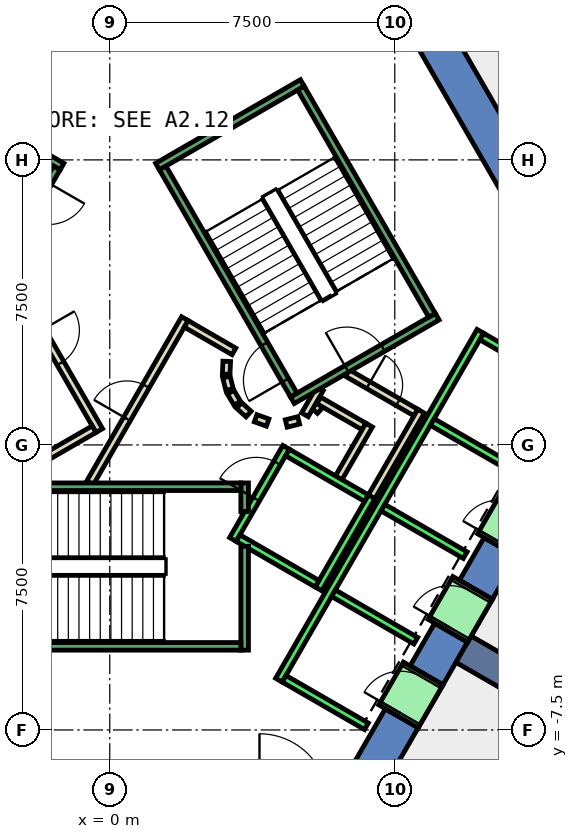
"""IFC4 building model, lengths in metres.
Left out: names, types, materials, properties, quantities, classifications, styles, units other than length and angle.
Written with IfcOpenShell. Run it as: python <this file> out.ifc"""

import sys

from ifc_helpers import new_model, si_unit, direction, frame, frame_2d, origin, place, context, subcontext, project, spatial, polyline, rectangle, outline, extrude, element, fill, save


model = new_model("IFC4")
c1 = context("Model", 3, precision=1e-05, world=origin(), true_north=direction((0.0, 1.0)))
c2 = subcontext(c1, "Body", "Model", "MODEL_VIEW")
j1 = project(units=[si_unit("LENGTHUNIT", "METRE"), si_unit("PLANEANGLEUNIT", "RADIAN")], contexts=[c1])
p1 = place(None, origin())
s1 = spatial("IfcSite", under=j1, at=p1, CompositionType="ELEMENT")
p2 = place(p1, origin())
s2 = spatial("IfcBuilding", under=s1, at=p2, CompositionType="ELEMENT")
p3 = place(p2, frame((0.0, 0.0, 47.6)))
s3 = spatial("IfcBuildingStorey", under=s2, at=p3, CompositionType="ELEMENT", Elevation=47.6)
p4 = place(p3, frame((0.0, 0.0, -0.4)))
e1 = element("IfcWall", 1, at=p4, inside=s3, PredefinedType="SHEAR", context=c2, shape_type="SweptSolid", body=[
    extrude(outline(polyline([(8.517, 11.748), (7.651, 11.248), (12.702, 2.5), (13.856, 2.5), (8.517, 11.748)])), origin(), (0.0, 0.0, 1.0), 4.2),
])
p5 = place(p3, frame((0.0, 0.0, -0.4)))
e2 = element("IfcWall", 2, at=p5, inside=s3, PredefinedType="SHEAR", context=c2, shape_type="SweptSolid", body=[
    extrude(outline(polyline([(8.117, -7.44), (7.252, -6.94), (6.351, -8.5), (6.928, -9.5), (8.117, -7.44)])), origin(), (0.0, 0.0, 1.0), 4.2),
])
p6 = place(p3, frame((0.0, 0.0, -0.4)))
e3 = element("IfcWall", 3, at=p6, inside=s3, PredefinedType="SHEAR", context=c2, shape_type="SweptSolid", body=[
    extrude(outline(polyline([(9.417, -5.189), (8.551, -4.689), (7.902, -5.814), (8.767, -6.314), (9.417, -5.189)])), origin(), (0.0, 0.0, 1.0), 4.2),
])
p7 = place(p3, frame((0.0, 0.0, -0.4)))
e4 = element("IfcWall", 4, at=p7, inside=s3, PredefinedType="SHEAR", context=c2, shape_type="SweptSolid", body=[
    extrude(outline(polyline([(10.717, -2.937), (9.851, -2.437), (9.201, -3.563), (10.067, -4.063), (10.717, -2.937)])), origin(), (0.0, 0.0, 1.0), 4.2),
])
p8 = place(p3, frame((0.0, 0.0, 3.6)))
e5 = element("IfcWall", 5, at=p8, inside=s3, PredefinedType="SHEAR", context=c2, shape_type="SweptSolid", body=[
    extrude(outline(polyline([(8.767, -6.314), (7.902, -5.814), (7.252, -6.94), (8.117, -7.44), (8.767, -6.314)])), origin(), (0.0, 0.0, 1.0), 0.2),
])
p9 = place(p3, frame((0.0, 0.0, 3.6)))
e6 = element("IfcWall", 6, at=p9, inside=s3, PredefinedType="SHEAR", context=c2, shape_type="SweptSolid", body=[
    extrude(outline(polyline([(10.067, -4.063), (9.201, -3.563), (8.551, -4.689), (9.417, -5.189), (10.067, -4.063)])), origin(), (0.0, 0.0, 1.0), 0.2),
])
p10 = place(p3, frame((0.0, 0.0, 3.6)))
e7 = element("IfcWall", 7, at=p10, inside=s3, PredefinedType="SHEAR", context=c2, shape_type="SweptSolid", body=[
    extrude(outline(polyline([(11.367, -1.811), (10.501, -1.311), (9.851, -2.437), (10.717, -2.937), (11.367, -1.811)])), origin(), (0.0, 0.0, 1.0), 0.2),
])
p11 = place(p3, frame((9.31, -5.375, -0.4), z_axis=(0.0, 0.0, 1.0), x_axis=(0.866017533419, -0.500013631625, 0.0)))
e8 = element("IfcWall", 8, at=p11, inside=s3, PredefinedType="SHEAR", context=c2, shape_type="SweptSolid", body=[
    extrude(rectangle(XDim=9.0, YDim=0.8, at=frame_2d((4.5, 0.0))), origin(), (0.0, 0.0, 1.0), 4.2),
])
p12 = place(p3, frame((5.39, 0.898, 0.0), z_axis=(0.0, 0.0, 1.0), x_axis=(0.673828488714, 0.738887791073, 0.0)))
e9 = element("IfcWall", 9, at=p12, inside=s3, PredefinedType="PARTITIONING", context=c2, shape_type="SweptSolid", body=[
    extrude(rectangle(XDim=0.263, YDim=0.2, at=frame_2d((0.131, 0.0))), origin(), (0.0, 0.0, 1.0), 3.8),
])
p13 = place(p3, frame((5.499, 1.172, 0.0), z_axis=(0.0, 0.0, 1.0), x_axis=(0.866333505267, -0.499465972466, 0.0)))
e10 = element("IfcWall", 10, at=p13, inside=s3, PredefinedType="PARTITIONING", context=c2, shape_type="SweptSolid", body=[
    extrude(rectangle(XDim=1.374, YDim=0.2, at=frame_2d((0.687, 0.0))), origin(), (0.0, 0.0, 1.0), 3.8),
])
p14 = place(p3, frame((6.826, 0.522, 0.0), z_axis=(0.0, 0.0, 1.0), x_axis=(-0.500016722714, -0.866015748706, 0.0)))
e11 = element("IfcWall", 11, at=p14, inside=s3, PredefinedType="PARTITIONING", context=c2, shape_type="SweptSolid", body=[
    extrude(rectangle(XDim=1.7, YDim=0.2, at=frame_2d((0.85, 0.0))), origin(), (0.0, 0.0, 1.0), 3.8),
])
p15 = place(p3, frame((6.25, 1.894, 0.0), z_axis=(0.0, 0.0, 1.0), x_axis=(0.866043184279, -0.499969202016, 0.0)))
e12 = element("IfcWall", 12, at=p15, inside=s3, PredefinedType="PARTITIONING", context=c2, shape_type="SweptSolid", body=[
    extrude(rectangle(XDim=2.084, YDim=0.2, at=frame_2d((1.042, 0.0))), origin(), (0.0, 0.0, 1.0), 3.8),
])
p16 = place(p15, frame((0.642, 0.0, 0.0)))
e13 = element("IfcOpeningElement", 13, at=p16, cuts=e12, PredefinedType="OPENING", context=c2, shape_type="SweptSolid", body=[
    extrude(rectangle(XDim=0.9, YDim=2.1, at=frame_2d((0.45, 1.05))), frame((0.0, 0.11, 0.0), z_axis=(0.0, -1.0, 0.0), x_axis=(1.0, 0.0, 0.0)), (0.0, 0.0, 1.0), 0.22),
])
p17 = place(p3, frame((8.192, 0.888, 0.0), z_axis=(0.0, 0.0, 1.0), x_axis=(-0.499940625693, -0.866059680843, 0.0)))
e14 = element("IfcWall", 14, at=p17, inside=s3, PredefinedType="PARTITIONING", context=c2, shape_type="SweptSolid", body=[
    extrude(rectangle(XDim=2.68, YDim=0.2, at=frame_2d((1.34, 0.0))), origin(), (0.0, 0.0, 1.0), 3.8),
])
p18 = place(p3, frame((5.135, 0.793, 0.0), z_axis=(0.0, 0.0, 1.0), x_axis=(0.499526442893, 0.866298639529, 0.0)))
e15 = element("IfcWall", 15, at=p18, inside=s3, PredefinedType="PARTITIONING", context=c2, shape_type="SweptSolid", body=[
    extrude(rectangle(XDim=0.791, YDim=0.2, at=frame_2d((0.396, 0.0))), origin(), (0.0, 0.0, 1.0), 3.8),
])
p19 = place(p3, frame((-0.52, -1.0, 0.0), z_axis=(0.0, 0.0, 1.0), x_axis=(0.50011622646, 0.865958290007, 0.0)))
e16 = element("IfcWall", 16, at=p19, inside=s3, PredefinedType="PARTITIONING", context=c2, shape_type="SweptSolid", body=[
    extrude(rectangle(XDim=4.991, YDim=0.2, at=frame_2d((2.496, 0.0))), origin(), (0.0, 0.0, 1.0), 3.8),
])
p20 = place(p19, frame((1.945, 0.0, 0.0)))
e17 = element("IfcOpeningElement", 17, at=p20, cuts=e16, PredefinedType="OPENING", context=c2, shape_type="SweptSolid", body=[
    extrude(rectangle(XDim=1.0, YDim=2.1, at=frame_2d((0.5, 1.05))), frame((0.0, 0.11, 0.0), z_axis=(0.0, -1.0, 0.0), x_axis=(1.0, 0.0, 0.0)), (0.0, 0.0, 1.0), 0.22),
])
p21 = place(p3, frame((2.012, 3.186, 0.0), z_axis=(0.0, 0.0, 1.0), x_axis=(0.865891012941, -0.500232699559, 0.0)))
e18 = element("IfcWall", 18, at=p21, inside=s3, PredefinedType="PARTITIONING", context=c2, shape_type="SweptSolid", body=[
    extrude(rectangle(XDim=1.449, YDim=0.2, at=frame_2d((0.725, 0.0))), origin(), (0.0, 0.0, 1.0), 3.8),
])
p22 = place(p3, frame((3.079, 2.199, 0.0), z_axis=(0.0, 0.0, 1.0), x_axis=(-0.047771483479, -0.998858290933, 0.0)))
e19 = element("IfcWall", 19, at=p22, inside=s3, PredefinedType="PARTITIONING", context=c2, shape_type="SweptSolid", body=[
    extrude(rectangle(XDim=0.337, YDim=0.2, at=frame_2d((0.169, 0.0))), origin(), (0.0, 0.0, 1.0), 3.8),
])
p23 = place(p3, frame((3.07, 1.786, 0.0), z_axis=(0.0, 0.0, 1.0), x_axis=(0.242705583207, -0.970099994784, 0.0)))
e20 = element("IfcWall", 20, at=p23, inside=s3, PredefinedType="PARTITIONING", context=c2, shape_type="SweptSolid", body=[
    extrude(rectangle(XDim=0.338, YDim=0.2, at=frame_2d((0.169, 0.0))), origin(), (0.0, 0.0, 1.0), 3.8),
])
for number, where, z_axis, x_axis in (
    (21, (3.182, 1.388, 0.0), (0.0, 0.0, 1.0), (0.512, -0.859, 0.0)),
    (22, (3.404, 1.039, 0.0), (0.0, 0.0, 1.0), (0.74, -0.672, 0.0)),
):
    element("IfcWall", number, at=place(p3, frame(where, z_axis=z_axis, x_axis=x_axis)), inside=s3, PredefinedType="PARTITIONING", context=c2, shape_type="SweptSolid", body=[
        extrude(rectangle(XDim=0.338, YDim=0.2, at=frame_2d((0.169, 0.0))), origin(), (0.0, 0.0, 1.0), 3.8),
    ])
p24 = place(p3, frame((3.838, 0.702, 0.0), z_axis=(0.0, 0.0, 1.0), x_axis=(0.941035081519, -0.338308993895, 0.0)))
e23 = element("IfcWall", 23, at=p24, inside=s3, PredefinedType="PARTITIONING", context=c2, shape_type="SweptSolid", body=[
    extrude(rectangle(XDim=0.337, YDim=0.2, at=frame_2d((0.168, 0.0))), origin(), (0.0, 0.0, 1.0), 3.8),
])
p25 = place(p3, frame((4.644, 0.564, 0.0), z_axis=(0.0, 0.0, 1.0), x_axis=(0.969929076366, 0.243387729394, 0.0)))
e24 = element("IfcWall", 24, at=p25, inside=s3, PredefinedType="PARTITIONING", context=c2, shape_type="SweptSolid", body=[
    extrude(rectangle(XDim=0.337, YDim=0.2, at=frame_2d((0.168, 0.0))), origin(), (0.0, 0.0, 1.0), 3.8),
])
p26 = place(p3, frame((-2.771, 4.7, 0.0), z_axis=(0.0, 0.0, 1.0), x_axis=(0.499969479948, -0.866043023828, 0.0)))
e25 = element("IfcWall", 25, at=p26, inside=s3, PredefinedType="PARTITIONING", context=c2, shape_type="SweptSolid", body=[
    extrude(rectangle(XDim=4.99, YDim=0.2, at=frame_2d((2.495, 0.0))), origin(), (0.0, 0.0, 1.0), 3.8),
])
p27 = place(p26, frame((1.945, 0.0, 0.0)))
e26 = element("IfcOpeningElement", 26, at=p27, cuts=e25, PredefinedType="OPENING", context=c2, shape_type="SweptSolid", body=[
    extrude(rectangle(XDim=1.0, YDim=2.1, at=frame_2d((0.5, 1.05))), frame((0.0, 0.11, 0.0), z_axis=(0.0, -1.0, 0.0), x_axis=(1.0, 0.0, 0.0)), (0.0, 0.0, 1.0), 0.22),
])
p28 = place(p3, frame((-0.412, 0.414, 0.0), z_axis=(0.0, 0.0, 1.0), x_axis=(-0.866017369001, -0.500013916395, 0.0)))
e27 = element("IfcWall", 27, at=p28, inside=s3, PredefinedType="PARTITIONING", context=c2, shape_type="SweptSolid", body=[
    extrude(rectangle(XDim=1.45, YDim=0.2, at=frame_2d((0.725, 0.0))), origin(), (0.0, 0.0, 1.0), 3.8),
])
p29 = place(p3, frame((12.401, -7.621, 0.0), z_axis=(0.0, 0.0, 1.0), x_axis=(-0.499983724212, -0.866034800411, 0.0)))
e28 = element("IfcWall", 28, at=p29, inside=s3, PredefinedType="PARTITIONING", context=c2, shape_type="SweptSolid", body=[
    extrude(rectangle(XDim=9.302, YDim=0.2, at=frame_2d((4.651, 0.0))), origin(), (0.0, 0.0, 1.0), 3.8),
])
p30 = place(p3, frame((3.24, -2.488, 0.0), z_axis=(0.0, 0.0, 1.0), x_axis=(0.49994636267, 0.866056369097, 0.0)))
e29 = element("IfcWall", 29, at=p30, inside=s3, PredefinedType="STANDARD", context=c2, shape_type="SweptSolid", body=[
    extrude(rectangle(XDim=2.8, YDim=0.2, at=frame_2d((1.4, 0.0))), origin(), (0.0, 0.0, 1.0), 3.8),
])
p31 = place(p30, frame((1.225, 0.0, 0.0)))
e30 = element("IfcOpeningElement", 30, at=p31, cuts=e29, PredefinedType="OPENING", context=c2, shape_type="SweptSolid", body=[
    extrude(rectangle(XDim=1.1, YDim=2.1, at=frame_2d((0.55, 1.05))), frame((0.0, 0.11, 0.0), z_axis=(0.0, -1.0, 0.0), x_axis=(1.0, 0.0, 0.0)), (0.0, 0.0, 1.0), 0.22),
])
p32 = place(p3, frame((5.492, -3.788, 0.0), z_axis=(0.0, 0.0, 1.0), x_axis=(0.500011755427, 0.866018616679, 0.0)))
e31 = element("IfcWall", 31, at=p32, inside=s3, PredefinedType="STANDARD", context=c2, shape_type="SweptSolid", body=[
    extrude(rectangle(XDim=2.8, YDim=0.2, at=frame_2d((1.4, 0.0))), origin(), (0.0, 0.0, 1.0), 3.8),
])
p33 = place(p3, frame((3.377, -2.452, 0.0), z_axis=(0.0, 0.0, 1.0), x_axis=(0.865955154139, -0.50012165622, 0.0)))
e32 = element("IfcWall", 32, at=p33, inside=s3, PredefinedType="STANDARD", context=c2, shape_type="SweptSolid", body=[
    extrude(rectangle(XDim=2.4, YDim=0.2, at=frame_2d((1.2, 0.0))), origin(), (0.0, 0.0, 1.0), 3.8),
])
p34 = place(p3, frame((4.677, -0.2, 0.0), z_axis=(0.0, 0.0, 1.0), x_axis=(0.865973769406, -0.500089422704, 0.0)))
e33 = element("IfcWall", 33, at=p34, inside=s3, PredefinedType="STANDARD", context=c2, shape_type="SweptSolid", body=[
    extrude(rectangle(XDim=2.399, YDim=0.2, at=frame_2d((1.2, 0.0))), origin(), (0.0, 0.0, 1.0), 3.8),
])
p35 = place(p3, frame((4.451, -6.19, 0.0), z_axis=(0.0, 0.0, 1.0), x_axis=(0.50000090737, 0.866024879913, 0.0)))
e34 = element("IfcWall", 34, at=p35, inside=s3, PredefinedType="STANDARD", context=c2, shape_type="SweptSolid", body=[
    extrude(rectangle(XDim=10.6, YDim=0.2, at=frame_2d((5.3, 0.0))), origin(), (0.0, 0.0, 1.0), 3.8),
])
for number, where, z_axis, x_axis in (
    (35, (4.588, -6.153, 0.0), (0.0, 0.0, 1.0), (0.866, -0.5, 0.0)),
    (36, (5.888, -3.902, 0.0), (0.0, 0.0, 1.0), (0.866, -0.5, 0.0)),
    (37, (7.188, -1.65, 0.0), (0.0, 0.0, 1.0), (0.866, -0.5, 0.0)),
    (38, (8.488, 0.602, 0.0), (0.0, 0.0, 1.0), (0.866, -0.5, 0.0)),
):
    element("IfcWall", number, at=place(p3, frame(where, z_axis=z_axis, x_axis=x_axis)), inside=s3, PredefinedType="STANDARD", context=c2, shape_type="SweptSolid", body=[
        extrude(rectangle(XDim=2.5, YDim=0.2, at=frame_2d((1.25, 0.0))), origin(), (0.0, 0.0, 1.0), 3.8),
    ])
p36 = place(p3, frame((9.788, 2.853, 0.0), z_axis=(0.0, 0.0, 1.0), x_axis=(0.865998541277, -0.500046524342, 0.0)))
e39 = element("IfcWall", 39, at=p36, inside=s3, PredefinedType="STANDARD", context=c2, shape_type="SweptSolid", body=[
    extrude(rectangle(XDim=2.5, YDim=0.2, at=frame_2d((1.25, 0.0))), origin(), (0.0, 0.0, 1.0), 3.8),
])
p37 = place(p3, frame((7.598, -7.14, 0.0), z_axis=(0.0, 0.0, 1.0), x_axis=(0.500362116554, 0.865816234728, 0.0)))
e40 = element("IfcWall", 40, at=p37, inside=s3, PredefinedType="STANDARD", context=c2, shape_type="SweptSolid", body=[
    extrude(rectangle(XDim=1.299, YDim=1.2, at=frame_2d((0.65, 0.0))), origin(), (0.0, 0.0, 1.0), 2.4),
])
p38 = place(p37, frame((0.1, 0.0, 0.0)))
e41 = element("IfcOpeningElement", 41, at=p38, cuts=e40, PredefinedType="OPENING", context=c2, shape_type="SweptSolid", body=[
    extrude(rectangle(XDim=1.1, YDim=2.3, at=frame_2d((0.55, 1.15))), frame((0.0, 0.61, 0.0), z_axis=(0.0, -1.0, 0.0), x_axis=(1.0, 0.0, 0.0)), (0.0, 0.0, 1.0), 1.22),
])
p39 = place(p3, frame((8.898, -4.889, 0.0), z_axis=(0.0, 0.0, 1.0), x_axis=(0.500036693733, 0.866004217611, 0.0)))
e42 = element("IfcWall", 42, at=p39, inside=s3, PredefinedType="STANDARD", context=c2, shape_type="SweptSolid", body=[
    extrude(rectangle(XDim=1.3, YDim=1.2, at=frame_2d((0.65, 0.0))), origin(), (0.0, 0.0, 1.0), 2.4),
])
p40 = place(p39, frame((0.1, 0.0, 0.0)))
e43 = element("IfcOpeningElement", 43, at=p40, cuts=e42, PredefinedType="OPENING", context=c2, shape_type="SweptSolid", body=[
    extrude(rectangle(XDim=1.1, YDim=2.3, at=frame_2d((0.55, 1.15))), frame((0.0, 0.61, 0.0), z_axis=(0.0, -1.0, 0.0), x_axis=(1.0, 0.0, 0.0)), (0.0, 0.0, 1.0), 1.22),
])
p41 = place(p3, frame((10.198, -2.637, 0.0), z_axis=(0.0, 0.0, 1.0), x_axis=(0.49989585183, 0.866085525409, 0.0)))
e44 = element("IfcWall", 44, at=p41, inside=s3, PredefinedType="STANDARD", context=c2, shape_type="SweptSolid", body=[
    extrude(rectangle(XDim=1.3, YDim=1.2, at=frame_2d((0.65, 0.0))), origin(), (0.0, 0.0, 1.0), 2.4),
])
p42 = place(p41, frame((0.1, 0.0, 0.0)))
e45 = element("IfcOpeningElement", 45, at=p42, cuts=e44, PredefinedType="OPENING", context=c2, shape_type="SweptSolid", body=[
    extrude(rectangle(XDim=1.1, YDim=2.3, at=frame_2d((0.55, 1.15))), frame((0.0, 0.61, 0.0), z_axis=(0.0, -1.0, 0.0), x_axis=(1.0, 0.0, 0.0)), (0.0, 0.0, 1.0), 1.22),
])
p43 = place(p3, frame((3.55, -2.667, 0.0), z_axis=(0.0, 0.0, 1.0), x_axis=(0.0, -1.0, 0.0)))
e46 = element("IfcWall", 46, at=p43, inside=s3, PredefinedType="STANDARD", context=c2, shape_type="SweptSolid", body=[
    extrude(rectangle(XDim=2.733, YDim=0.2, at=frame_2d((1.366, 0.0))), origin(), (0.0, 0.0, 1.0), 3.8),
])
p44 = place(p3, frame((3.55, -1.0, 0.0), z_axis=(0.0, 0.0, 1.0), x_axis=(0.0, -1.0, 0.0)))
e47 = element("IfcWall", 47, at=p44, inside=s3, PredefinedType="STANDARD", context=c2, shape_type="SweptSolid", body=[
    extrude(rectangle(XDim=0.751, YDim=0.2, at=frame_2d((0.375, 0.0))), origin(), (0.0, 0.0, 1.0), 3.8),
])
p45 = place(p3, frame((-3.45, -1.1, 0.0), z_axis=(0.0, 0.0, 1.0), x_axis=(1.0, 0.0, 0.0)))
e48 = element("IfcWall", 48, at=p45, inside=s3, PredefinedType="STANDARD", context=c2, shape_type="SweptSolid", body=[
    extrude(rectangle(XDim=6.9, YDim=0.2, at=frame_2d((3.45, 0.0))), origin(), (0.0, 0.0, 1.0), 3.8),
])
p46 = place(p45, frame((0.45, 0.0, 0.0)))
e49 = element("IfcOpeningElement", 49, at=p46, cuts=e48, PredefinedType="OPENING", context=c2, shape_type="SweptSolid", body=[
    extrude(rectangle(XDim=1.1, YDim=2.2, at=frame_2d((0.55, 1.1))), frame((0.0, 0.11, 0.0), z_axis=(0.0, -1.0, 0.0), x_axis=(1.0, 0.0, 0.0)), (0.0, 0.0, 1.0), 0.22),
])
p47 = place(p3, frame((-3.45, -5.3, 0.0), z_axis=(0.0, 0.0, 1.0), x_axis=(1.0, 0.0, 0.0)))
e50 = element("IfcWall", 50, at=p47, inside=s3, PredefinedType="STANDARD", context=c2, shape_type="SweptSolid", body=[
    extrude(rectangle(XDim=6.9, YDim=0.2, at=frame_2d((3.45, 0.0))), origin(), (0.0, 0.0, 1.0), 3.8),
])
p48 = place(p3, frame((4.806, 1.176, 0.0), z_axis=(0.0, 0.0, 1.0), x_axis=(0.866059941101, 0.499940174841, 0.0)))
e51 = element("IfcWall", 51, at=p48, inside=s3, PredefinedType="STANDARD", context=c2, shape_type="SweptSolid", body=[
    extrude(rectangle(XDim=4.4, YDim=0.2, at=frame_2d((2.2, 0.0))), origin(), (0.0, 0.0, 1.0), 3.8),
])
p49 = place(p48, frame((1.65, 0.0, 0.0)))
e52 = element("IfcOpeningElement", 52, at=p49, cuts=e51, PredefinedType="OPENING", context=c2, shape_type="SweptSolid", body=[
    extrude(rectangle(XDim=1.1, YDim=2.2, at=frame_2d((0.55, 1.1))), frame((0.0, 0.11, 0.0), z_axis=(0.0, -1.0, 0.0), x_axis=(1.0, 0.0, 0.0)), (0.0, 0.0, 1.0), 0.22),
])
p50 = place(p3, frame((1.256, 7.324, 0.0), z_axis=(0.0, 0.0, 1.0), x_axis=(0.866046073146, 0.499964197906, 0.0)))
e53 = element("IfcWall", 53, at=p50, inside=s3, PredefinedType="STANDARD", context=c2, shape_type="SweptSolid", body=[
    extrude(rectangle(XDim=4.4, YDim=0.2, at=frame_2d((2.2, 0.0))), origin(), (0.0, 0.0, 1.0), 3.8),
])
p51 = place(p3, frame((4.843, 1.312, 0.0), z_axis=(0.0, 0.0, 1.0), x_axis=(-0.499963383562, 0.866046543262, 0.0)))
e54 = element("IfcWall", 54, at=p51, inside=s3, PredefinedType="STANDARD", context=c2, shape_type="SweptSolid", body=[
    extrude(rectangle(XDim=6.9, YDim=0.2, at=frame_2d((3.45, 0.0))), origin(), (0.0, 0.0, 1.0), 3.8),
])
p52 = place(p51, frame((0.45, 0.0, 0.0)))
e55 = element("IfcOpeningElement", 55, at=p52, cuts=e54, PredefinedType="OPENING", context=c2, shape_type="SweptSolid", body=[
    extrude(rectangle(XDim=1.1, YDim=2.2, at=frame_2d((0.55, 1.1))), frame((0.0, 0.11, 0.0), z_axis=(0.0, -1.0, 0.0), x_axis=(1.0, 0.0, 0.0)), (0.0, 0.0, 1.0), 0.22),
])
p53 = place(p3, frame((8.48, 3.412, 0.0), z_axis=(0.0, 0.0, 1.0), x_axis=(-0.499978703459, 0.866037698999, 0.0)))
e56 = element("IfcWall", 56, at=p53, inside=s3, PredefinedType="STANDARD", context=c2, shape_type="SweptSolid", body=[
    extrude(rectangle(XDim=6.9, YDim=0.2, at=frame_2d((3.45, 0.0))), origin(), (0.0, 0.0, 1.0), 3.8),
])
p54 = place(p3, frame((-1.256, 7.324, 0.0), z_axis=(0.0, 0.0, 1.0), x_axis=(-0.866046073146, 0.499964197906, 0.0)))
e57 = element("IfcWall", 57, at=p54, inside=s3, PredefinedType="STANDARD", context=c2, shape_type="SweptSolid", body=[
    extrude(rectangle(XDim=4.4, YDim=0.2, at=frame_2d((2.2, 0.0))), origin(), (0.0, 0.0, 1.0), 3.8),
])
p55 = place(p54, frame((1.65, 0.0, 0.0)))
e58 = element("IfcOpeningElement", 58, at=p55, cuts=e57, PredefinedType="OPENING", context=c2, shape_type="SweptSolid", body=[
    extrude(rectangle(XDim=1.1, YDim=2.2, at=frame_2d((0.55, 1.1))), frame((0.0, 0.11, 0.0), z_axis=(0.0, -1.0, 0.0), x_axis=(1.0, 0.0, 0.0)), (0.0, 0.0, 1.0), 0.22),
])
p56 = place(p3, frame((-1.393, 7.288, 0.0), z_axis=(0.0, 0.0, 1.0), x_axis=(-0.499963383562, -0.866046543262, 0.0)))
e59 = element("IfcWall", 59, at=p56, inside=s3, PredefinedType="STANDARD", context=c2, shape_type="SweptSolid", body=[
    extrude(rectangle(XDim=6.9, YDim=0.2, at=frame_2d((3.45, 0.0))), origin(), (0.0, 0.0, 1.0), 3.8),
])
p57 = place(p56, frame((0.45, 0.0, 0.0)))
e60 = element("IfcOpeningElement", 60, at=p57, cuts=e59, PredefinedType="OPENING", context=c2, shape_type="SweptSolid", body=[
    extrude(rectangle(XDim=1.1, YDim=2.2, at=frame_2d((0.55, 1.1))), frame((0.0, 0.11, 0.0), z_axis=(0.0, -1.0, 0.0), x_axis=(1.0, 0.0, 0.0)), (0.0, 0.0, 1.0), 0.22),
])
p58 = place(p20, origin())
e61 = element("IfcDoor", 61, at=p58, inside=s3, OperationType="SINGLE_SWING_LEFT", PredefinedType="DOOR", context=c2, shape_type="SweptSolid", body=[
    extrude(rectangle(XDim=1.0, YDim=2.1, at=frame_2d((0.5, 1.05))), frame((0.0, 0.025, 0.0), z_axis=(0.0, -1.0, 0.0), x_axis=(1.0, 0.0, 0.0)), (0.0, 0.0, 1.0), 0.05),
])
fill(e17, e61)
p59 = place(p27, origin())
e62 = element("IfcDoor", 62, at=p59, inside=s3, OperationType="SINGLE_SWING_RIGHT", PredefinedType="DOOR", context=c2, shape_type="SweptSolid", body=[
    extrude(rectangle(XDim=1.0, YDim=2.1, at=frame_2d((0.5, 1.05))), frame((0.0, 0.025, 0.0), z_axis=(0.0, -1.0, 0.0), x_axis=(1.0, 0.0, 0.0)), (0.0, 0.0, 1.0), 0.05),
])
fill(e26, e62)
p60 = place(p16, origin())
e63 = element("IfcDoor", 63, at=p60, inside=s3, OperationType="SINGLE_SWING_LEFT", PredefinedType="DOOR", context=c2, shape_type="SweptSolid", body=[
    extrude(rectangle(XDim=0.9, YDim=2.1, at=frame_2d((0.45, 1.05))), frame((0.0, 0.025, 0.0), z_axis=(0.0, -1.0, 0.0), x_axis=(1.0, 0.0, 0.0)), (0.0, 0.0, 1.0), 0.05),
])
fill(e13, e63)
p61 = place(p38, origin())
e64 = element("IfcDoor", 64, at=p61, inside=s3, OperationType="SLIDING_TO_LEFT", PredefinedType="DOOR", context=c2, shape_type="SweptSolid", body=[
    extrude(rectangle(XDim=1.1, YDim=2.3, at=frame_2d((0.55, 1.15))), frame((0.0, 0.025, 0.0), z_axis=(0.0, -1.0, 0.0), x_axis=(1.0, 0.0, 0.0)), (0.0, 0.0, 1.0), 0.05),
])
fill(e41, e64)
p62 = place(p40, origin())
e65 = element("IfcDoor", 65, at=p62, inside=s3, OperationType="SLIDING_TO_LEFT", PredefinedType="DOOR", context=c2, shape_type="SweptSolid", body=[
    extrude(rectangle(XDim=1.1, YDim=2.3, at=frame_2d((0.55, 1.15))), frame((0.0, 0.025, 0.0), z_axis=(0.0, -1.0, 0.0), x_axis=(1.0, 0.0, 0.0)), (0.0, 0.0, 1.0), 0.05),
])
fill(e43, e65)
p63 = place(p31, origin())
e66 = element("IfcDoor", 66, at=p63, inside=s3, OperationType="SLIDING_TO_LEFT", PredefinedType="DOOR", context=c2, shape_type="SweptSolid", body=[
    extrude(rectangle(XDim=1.1, YDim=2.1, at=frame_2d((0.55, 1.05))), frame((0.0, 0.025, 0.0), z_axis=(0.0, -1.0, 0.0), x_axis=(1.0, 0.0, 0.0)), (0.0, 0.0, 1.0), 0.05),
])
fill(e30, e66)
p64 = place(p52, origin())
e67 = element("IfcDoor", 67, at=p64, inside=s3, OperationType="SINGLE_SWING_LEFT", PredefinedType="DOOR", context=c2, shape_type="SweptSolid", body=[
    extrude(rectangle(XDim=1.1, YDim=2.2, at=frame_2d((0.55, 1.1))), frame((0.0, 0.025, 0.0), z_axis=(0.0, -1.0, 0.0), x_axis=(1.0, 0.0, 0.0)), (0.0, 0.0, 1.0), 0.05),
])
fill(e55, e67)
p65 = place(p49, origin())
e68 = element("IfcDoor", 68, at=p65, inside=s3, OperationType="SINGLE_SWING_LEFT", PredefinedType="DOOR", context=c2, shape_type="SweptSolid", body=[
    extrude(rectangle(XDim=1.1, YDim=2.2, at=frame_2d((0.55, 1.1))), frame((0.0, 0.025, 0.0), z_axis=(0.0, -1.0, 0.0), x_axis=(1.0, 0.0, 0.0)), (0.0, 0.0, 1.0), 0.05),
])
fill(e52, e68)
save(model, sys.argv[1])
